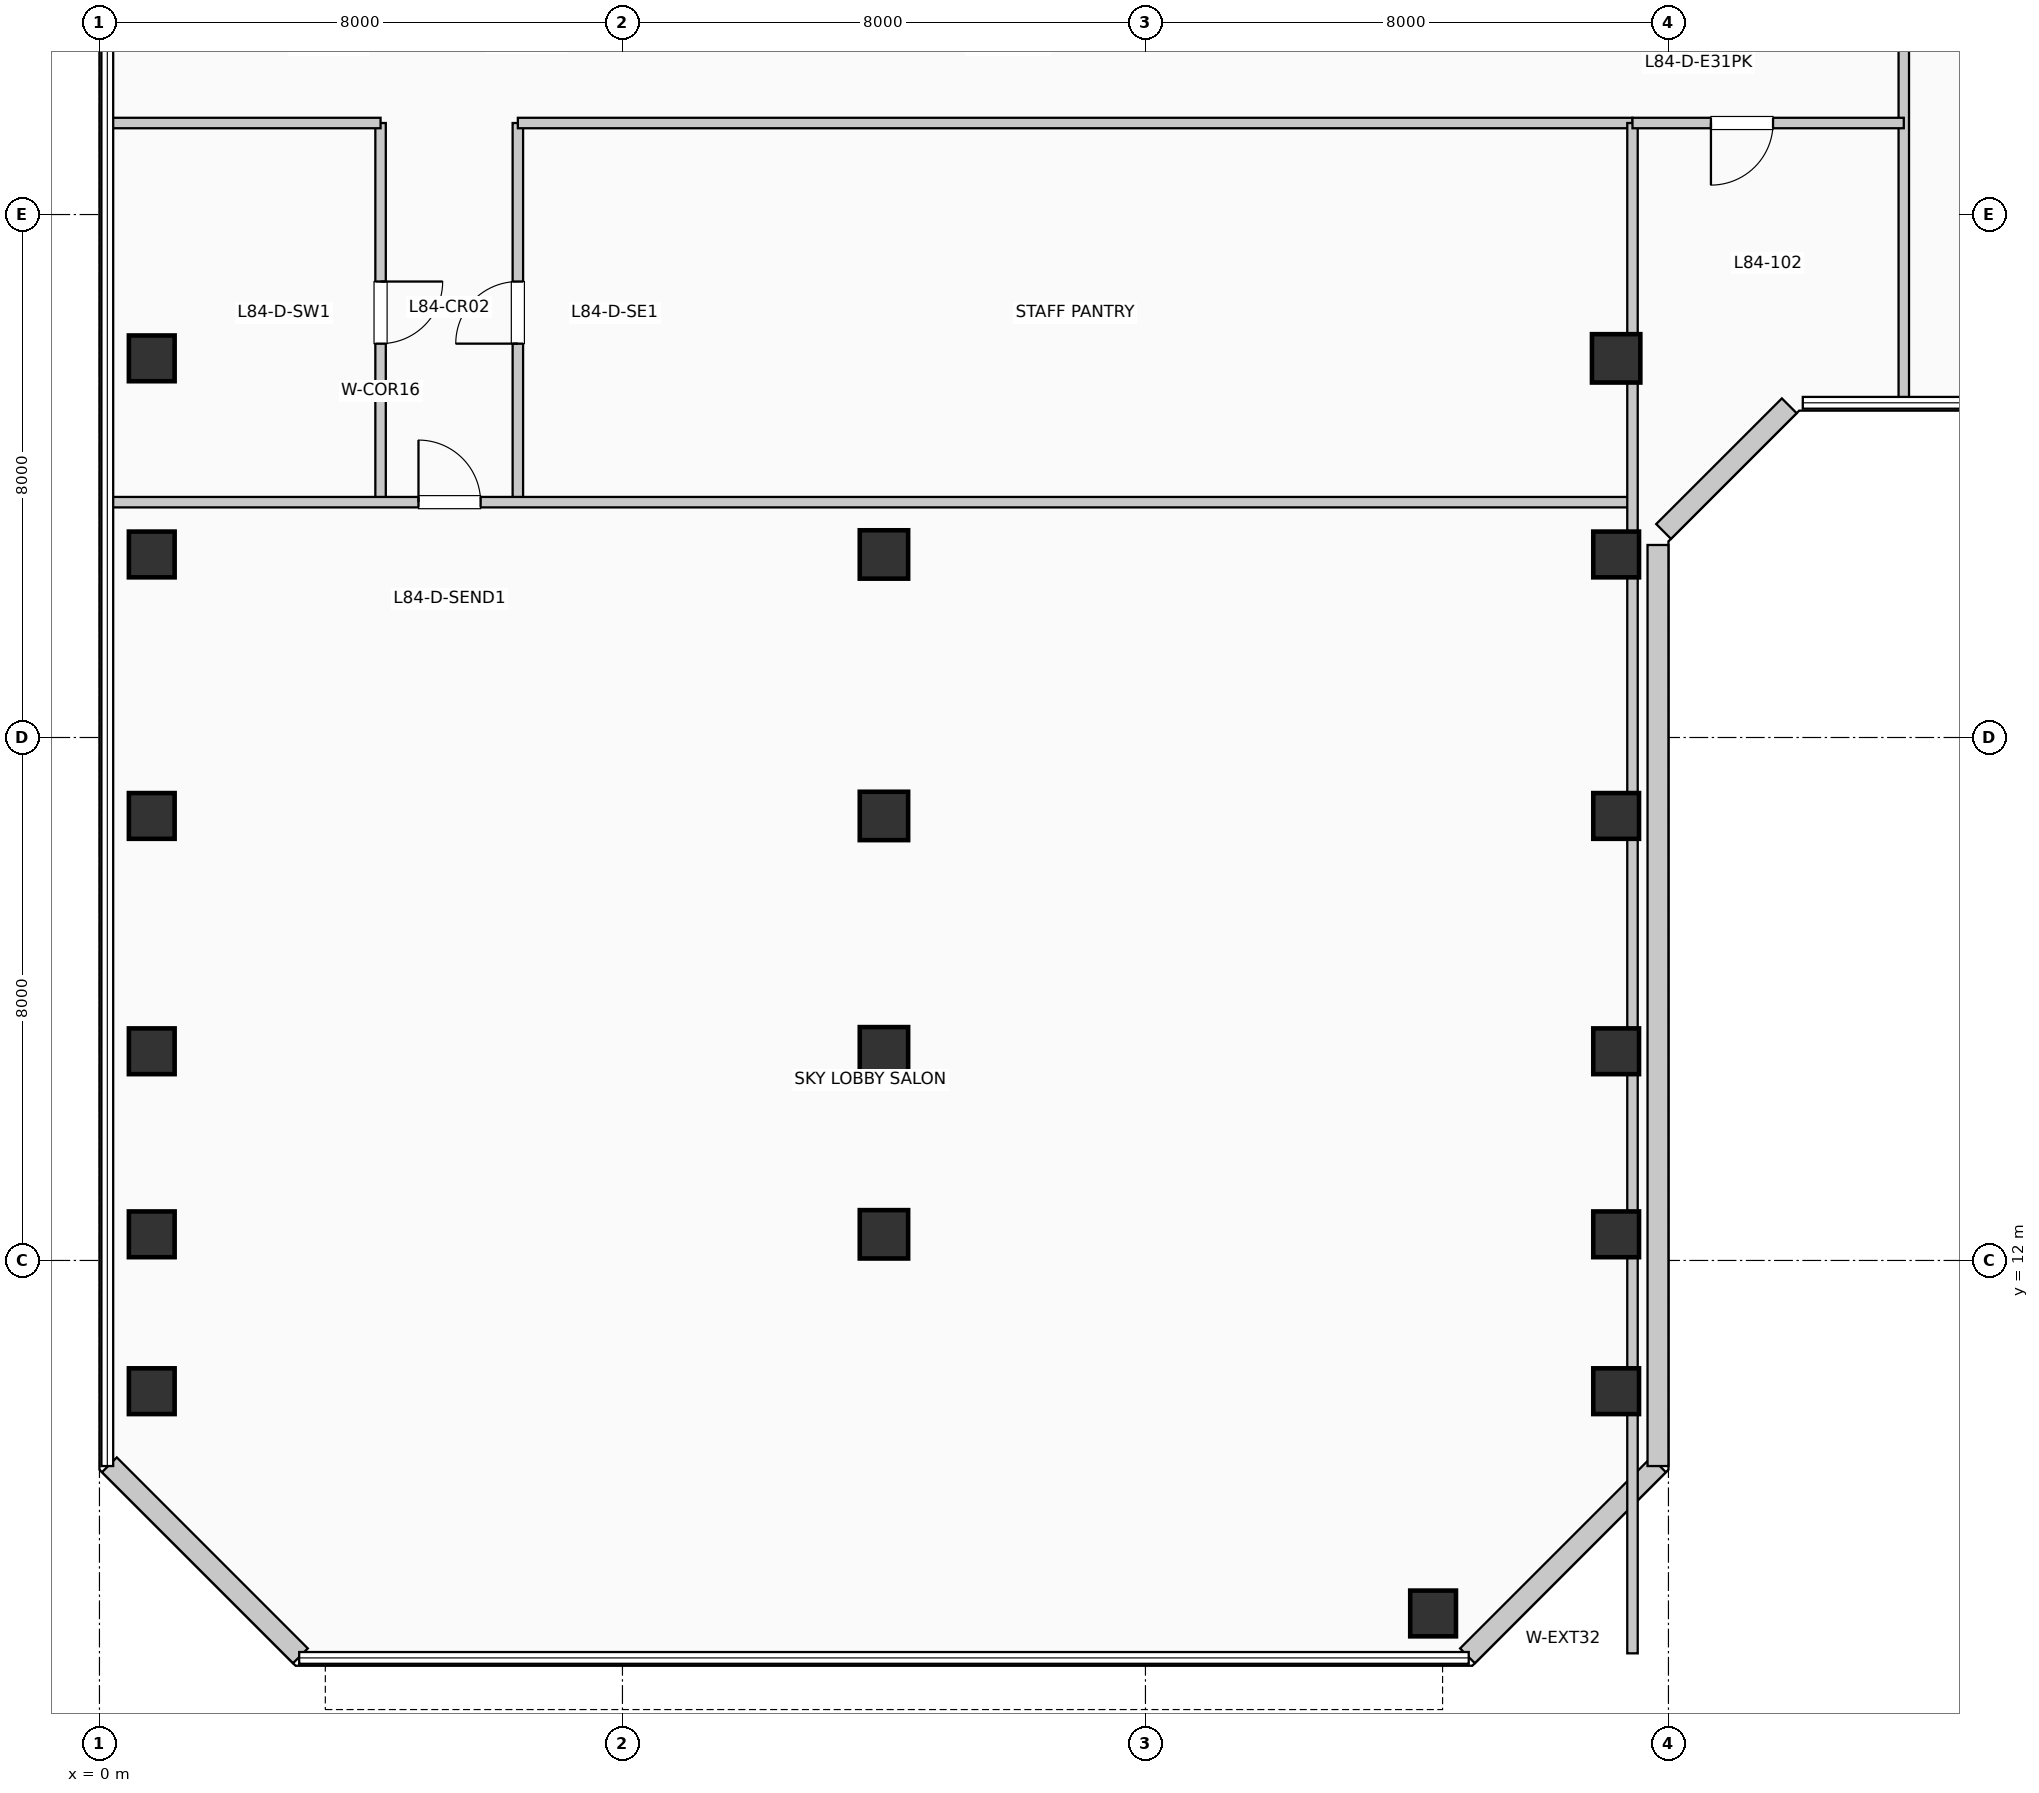
"""IFC4 building model, lengths in metres.
Left out: names, types, materials, properties, quantities, classifications, styles, units other than length and angle.
Written with IfcOpenShell. Run it as: python <this file> out.ifc"""

import sys

from ifc_helpers import new_model, si_unit, direction, frame, frame_2d, origin, origin_2d, place, context, subcontext, project, spatial, rectangle, extrude, element, fill, save


model = new_model("IFC4")
c1 = context("Model", 3, precision=1e-05, world=origin(), true_north=direction((0.0, 1.0)))
c2 = subcontext(c1, "Body", "Model", "MODEL_VIEW")
j1 = project(units=[si_unit("LENGTHUNIT", "METRE"), si_unit("PLANEANGLEUNIT", "RADIAN")], contexts=[c1])
p1 = place(None, origin())
s1 = spatial("IfcSite", under=j1, at=p1, CompositionType="ELEMENT")
p2 = place(p1, origin())
s2 = spatial("IfcBuilding", under=s1, at=p2, CompositionType="ELEMENT")
p3 = place(p2, frame((0.0, 0.0, 343.53)))
s3 = spatial("IfcBuildingStorey", under=s2, at=p3, CompositionType="ELEMENT", Elevation=343.53)
for number, where, z_axis, x_axis in (
    (1, (0.8, 10.0, 0.0), (0.0, 0.0, 1.0), (1.0, 0.0, 0.0)),
    (2, (0.8, 12.4, 0.0), (0.0, 0.0, 1.0), (1.0, 0.0, 0.0)),
    (3, (0.8, 15.2, 0.0), (0.0, 0.0, 1.0), (1.0, 0.0, 0.0)),
    (4, (0.8, 18.8, 0.0), (0.0, 0.0, 1.0), (1.0, 0.0, 0.0)),
    (5, (0.8, 22.8, 0.0), (0.0, 0.0, 1.0), (1.0, 0.0, 0.0)),
    (6, (0.8, 25.8, 0.0), (0.0, 0.0, 1.0), (1.0, 0.0, 0.0)),
):
    element("IfcColumn", number, at=place(p3, frame(where, z_axis=z_axis, x_axis=x_axis)), inside=s3, PredefinedType="COLUMN", context=c2, shape_type="SweptSolid", body=[
        extrude(rectangle(XDim=0.7, YDim=0.7, at=origin_2d()), origin(), (0.0, 0.0, 1.0), 3.96),
    ])
for number, where, z_axis, x_axis in (
    (7, (12.0, 12.4, 0.0), (0.0, 0.0, 1.0), (1.0, 0.0, 0.0)),
    (8, (12.0, 15.2, 0.0), (0.0, 0.0, 1.0), (1.0, 0.0, 0.0)),
    (9, (12.0, 18.8, 0.0), (0.0, 0.0, 1.0), (1.0, 0.0, 0.0)),
    (10, (12.0, 22.8, 0.0), (0.0, 0.0, 1.0), (1.0, 0.0, 0.0)),
):
    element("IfcColumn", number, at=place(p3, frame(where, z_axis=z_axis, x_axis=x_axis)), inside=s3, PredefinedType="COLUMN", context=c2, shape_type="SweptSolid", body=[
        extrude(rectangle(XDim=0.74, YDim=0.74, at=origin_2d()), origin(), (0.0, 0.0, 1.0), 3.96),
    ])
for number, where, z_axis, x_axis in (
    (11, (20.4, 6.6, 0.0), (0.0, 0.0, 1.0), (1.0, 0.0, 0.0)),
    (12, (23.2, 10.0, 0.0), (0.0, 0.0, 1.0), (1.0, 0.0, 0.0)),
    (13, (23.2, 12.4, 0.0), (0.0, 0.0, 1.0), (1.0, 0.0, 0.0)),
    (14, (23.2, 15.2, 0.0), (0.0, 0.0, 1.0), (1.0, 0.0, 0.0)),
    (15, (23.2, 18.8, 0.0), (0.0, 0.0, 1.0), (1.0, 0.0, 0.0)),
    (16, (23.2, 22.8, 0.0), (0.0, 0.0, 1.0), (1.0, 0.0, 0.0)),
):
    element("IfcColumn", number, at=place(p3, frame(where, z_axis=z_axis, x_axis=x_axis)), inside=s3, PredefinedType="COLUMN", context=c2, shape_type="SweptSolid", body=[
        extrude(rectangle(XDim=0.7, YDim=0.7, at=origin_2d()), origin(), (0.0, 0.0, 1.0), 3.96),
    ])
p4 = place(p3, frame((23.2, 25.8, 0.0), z_axis=(0.0, 0.0, 1.0), x_axis=(1.0, 0.0, 0.0)))
e17 = element("IfcColumn", 17, at=p4, inside=s3, PredefinedType="COLUMN", context=c2, shape_type="SweptSolid", body=[
    extrude(rectangle(XDim=0.74, YDim=0.74, at=origin_2d()), origin(), (0.0, 0.0, 1.0), 3.96),
])
p5 = place(p3, frame((20.926, 5.952, 0.0), z_axis=(0.0, 0.0, 1.0), x_axis=(0.707077242712, 0.707136318428, 0.0)))
e18 = element("IfcWall", 18, at=p5, inside=s3, PredefinedType="SOLIDWALL", context=c2, shape_type="SweptSolid", body=[
    extrude(rectangle(XDim=4.133, YDim=0.32, at=frame_2d((2.066, 0.0))), origin(), (0.0, 0.0, 1.0), 3.71),
])
p6 = place(p3, frame((23.84, 8.855, 0.0), z_axis=(0.0, 0.0, 1.0), x_axis=(0.0, 1.0, 0.0)))
e19 = element("IfcWall", 19, at=p6, inside=s3, PredefinedType="SOLIDWALL", context=c2, shape_type="SweptSolid", body=[
    extrude(rectangle(XDim=14.09, YDim=0.32, at=frame_2d((7.045, 0.0))), origin(), (0.0, 0.0, 1.0), 3.71),
])
p7 = place(p3, frame((23.926, 23.152, 0.0), z_axis=(0.0, 0.0, 1.0), x_axis=(0.707106781187, 0.707106781187, 0.0)))
e20 = element("IfcWall", 20, at=p7, inside=s3, PredefinedType="SOLIDWALL", context=c2, shape_type="SweptSolid", body=[
    extrude(rectangle(XDim=2.718, YDim=0.32, at=frame_2d((1.359, 0.0))), origin(), (0.0, 0.0, 1.0), 3.71),
])
p8 = place(p3, frame((0.152, 8.874, 0.0), z_axis=(0.0, 0.0, 1.0), x_axis=(0.707077242712, -0.707136318428, 0.0)))
e21 = element("IfcWall", 21, at=p8, inside=s3, PredefinedType="SOLIDWALL", context=c2, shape_type="SweptSolid", body=[
    extrude(rectangle(XDim=4.133, YDim=0.32, at=frame_2d((2.066, 0.0))), origin(), (0.0, 0.0, 1.0), 3.71),
])
p9 = place(p3, frame((4.3, 23.6, 0.0), z_axis=(0.0, 0.0, 1.0), x_axis=(0.0, 1.0, 0.0)))
e22 = element("IfcWall", 22, at=p9, inside=s3, PredefinedType="PARTITIONING", context=c2, shape_type="SweptSolid", body=[
    extrude(rectangle(XDim=5.8, YDim=0.16, at=frame_2d((2.9, 0.0))), origin(), (0.0, 0.0, 1.0), 3.71),
])
p10 = place(p9, frame((3.375, 0.0, 0.0), z_axis=(0.0, 0.0, 1.0), x_axis=(-1.0, 0.0, 0.0)))
e23 = element("IfcOpeningElement", 23, at=p10, cuts=e22, PredefinedType="OPENING", context=c2, shape_type="SweptSolid", body=[
    extrude(rectangle(XDim=0.95, YDim=2.15, at=frame_2d((0.475, 1.075))), frame((0.0, 0.09, 0.0), z_axis=(0.0, -1.0, 0.0), x_axis=(1.0, 0.0, 0.0)), (0.0, 0.0, 1.0), 0.18),
])
p11 = place(p3, frame((6.4, 23.6, 0.0), z_axis=(0.0, 0.0, 1.0), x_axis=(0.0, 1.0, 0.0)))
e24 = element("IfcWall", 24, at=p11, inside=s3, PredefinedType="PARTITIONING", context=c2, shape_type="SweptSolid", body=[
    extrude(rectangle(XDim=5.8, YDim=0.16, at=frame_2d((2.9, 0.0))), origin(), (0.0, 0.0, 1.0), 3.71),
])
p12 = place(p11, frame((2.425, 0.0, 0.0)))
e25 = element("IfcOpeningElement", 25, at=p12, cuts=e24, PredefinedType="OPENING", context=c2, shape_type="SweptSolid", body=[
    extrude(rectangle(XDim=0.95, YDim=2.15, at=frame_2d((0.475, 1.075))), frame((0.0, 0.09, 0.0), z_axis=(0.0, -1.0, 0.0), x_axis=(1.0, 0.0, 0.0)), (0.0, 0.0, 1.0), 0.18),
])
p13 = place(p3, frame((0.19, 23.6, 0.0), z_axis=(0.0, 0.0, 1.0), x_axis=(1.0, 0.0, 0.0)))
e26 = element("IfcWall", 26, at=p13, inside=s3, PredefinedType="PARTITIONING", context=c2, shape_type="SweptSolid", body=[
    extrude(rectangle(XDim=23.26, YDim=0.16, at=frame_2d((11.63, 0.0))), origin(), (0.0, 0.0, 1.0), 3.71),
])
p14 = place(p13, frame((4.69, 0.0, 0.0)))
e27 = element("IfcOpeningElement", 27, at=p14, cuts=e26, PredefinedType="OPENING", context=c2, shape_type="SweptSolid", body=[
    extrude(rectangle(XDim=0.95, YDim=2.15, at=frame_2d((0.475, 1.075))), frame((0.0, 0.09, 0.0), z_axis=(0.0, -1.0, 0.0), x_axis=(1.0, 0.0, 0.0)), (0.0, 0.0, 1.0), 0.18),
])
p15 = place(p3, frame((0.19, 29.4, 0.0), z_axis=(0.0, 0.0, 1.0), x_axis=(1.0, 0.0, 0.0)))
e28 = element("IfcWall", 28, at=p15, inside=s3, PredefinedType="PARTITIONING", context=c2, shape_type="SweptSolid", body=[
    extrude(rectangle(XDim=4.11, YDim=0.16, at=frame_2d((2.055, 0.0))), origin(), (0.0, 0.0, 1.0), 3.395),
])
p16 = place(p3, frame((6.4, 29.4, 0.0), z_axis=(0.0, 0.0, 1.0), x_axis=(1.0, 0.0, 0.0)))
e29 = element("IfcWall", 29, at=p16, inside=s3, PredefinedType="PARTITIONING", context=c2, shape_type="SweptSolid", body=[
    extrude(rectangle(XDim=17.05, YDim=0.16, at=frame_2d((8.525, 0.0))), origin(), (0.0, 0.0, 1.0), 3.395),
])
p17 = place(p3, frame((23.45, 5.99, 0.0), z_axis=(0.0, 0.0, 1.0), x_axis=(0.0, 1.0, 0.0)))
e30 = element("IfcWall", 30, at=p17, inside=s3, PredefinedType="PARTITIONING", context=c2, shape_type="SweptSolid", body=[
    extrude(rectangle(XDim=23.41, YDim=0.16, at=frame_2d((11.705, 0.0))), origin(), (0.0, 0.0, 1.0), 3.145),
])
p18 = place(p3, frame((27.6, 25.19, 0.0), z_axis=(0.0, 0.0, 1.0), x_axis=(0.0, 1.0, 0.0)))
e31 = element("IfcWall", 31, at=p18, inside=s3, PredefinedType="PARTITIONING", context=c2, shape_type="SweptSolid", body=[
    extrude(rectangle(XDim=15.21, YDim=0.16, at=frame_2d((7.605, 0.0))), origin(), (0.0, 0.0, 1.0), 3.71),
])
p19 = place(p3, frame((23.45, 29.4, 0.0), z_axis=(0.0, 0.0, 1.0), x_axis=(1.0, 0.0, 0.0)))
e32 = element("IfcWall", 32, at=p19, inside=s3, PredefinedType="PARTITIONING", context=c2, shape_type="SweptSolid", body=[
    extrude(rectangle(XDim=4.15, YDim=0.16, at=frame_2d((2.075, 0.0))), origin(), (0.0, 0.0, 1.0), 3.395),
])
p20 = place(p19, frame((2.15, 0.0, 0.0), z_axis=(0.0, 0.0, 1.0), x_axis=(-1.0, 0.0, 0.0)))
e33 = element("IfcOpeningElement", 33, at=p20, cuts=e32, PredefinedType="OPENING", context=c2, shape_type="SweptSolid", body=[
    extrude(rectangle(XDim=0.95, YDim=2.15, at=frame_2d((0.475, 1.075))), frame((0.0, 0.09, 0.0), z_axis=(0.0, -1.0, 0.0), x_axis=(1.0, 0.0, 0.0)), (0.0, 0.0, 1.0), 0.18),
])
p21 = place(p14, origin())
e34 = element("IfcDoor", 34, at=p21, inside=s3, OperationType="SINGLE_SWING_LEFT", PredefinedType="DOOR", context=c2, shape_type="SweptSolid", body=[
    extrude(rectangle(XDim=0.95, YDim=2.15, at=frame_2d((0.475, 1.075))), frame((0.0, 0.025, 0.0), z_axis=(0.0, -1.0, 0.0), x_axis=(1.0, 0.0, 0.0)), (0.0, 0.0, 1.0), 0.05),
])
fill(e27, e34)
p22 = place(p10, origin())
e35 = element("IfcDoor", 35, at=p22, inside=s3, OperationType="SINGLE_SWING_RIGHT", PredefinedType="DOOR", context=c2, shape_type="SweptSolid", body=[
    extrude(rectangle(XDim=0.95, YDim=2.15, at=frame_2d((0.475, 1.075))), frame((0.0, 0.025, 0.0), z_axis=(0.0, -1.0, 0.0), x_axis=(1.0, 0.0, 0.0)), (0.0, 0.0, 1.0), 0.05),
])
fill(e23, e35)
p23 = place(p12, origin())
e36 = element("IfcDoor", 36, at=p23, inside=s3, OperationType="SINGLE_SWING_LEFT", PredefinedType="DOOR", context=c2, shape_type="SweptSolid", body=[
    extrude(rectangle(XDim=0.95, YDim=2.15, at=frame_2d((0.475, 1.075))), frame((0.0, 0.025, 0.0), z_axis=(0.0, -1.0, 0.0), x_axis=(1.0, 0.0, 0.0)), (0.0, 0.0, 1.0), 0.05),
])
fill(e25, e36)
p24 = place(p20, origin())
e37 = element("IfcDoor", 37, at=p24, inside=s3, OperationType="SINGLE_SWING_LEFT", PredefinedType="DOOR", context=c2, shape_type="SweptSolid", body=[
    extrude(rectangle(XDim=0.95, YDim=2.15, at=frame_2d((0.475, 1.075))), frame((0.0, 0.025, 0.0), z_axis=(0.0, -1.0, 0.0), x_axis=(1.0, 0.0, 0.0)), (0.0, 0.0, 1.0), 0.05),
])
fill(e33, e37)
save(model, sys.argv[1])
